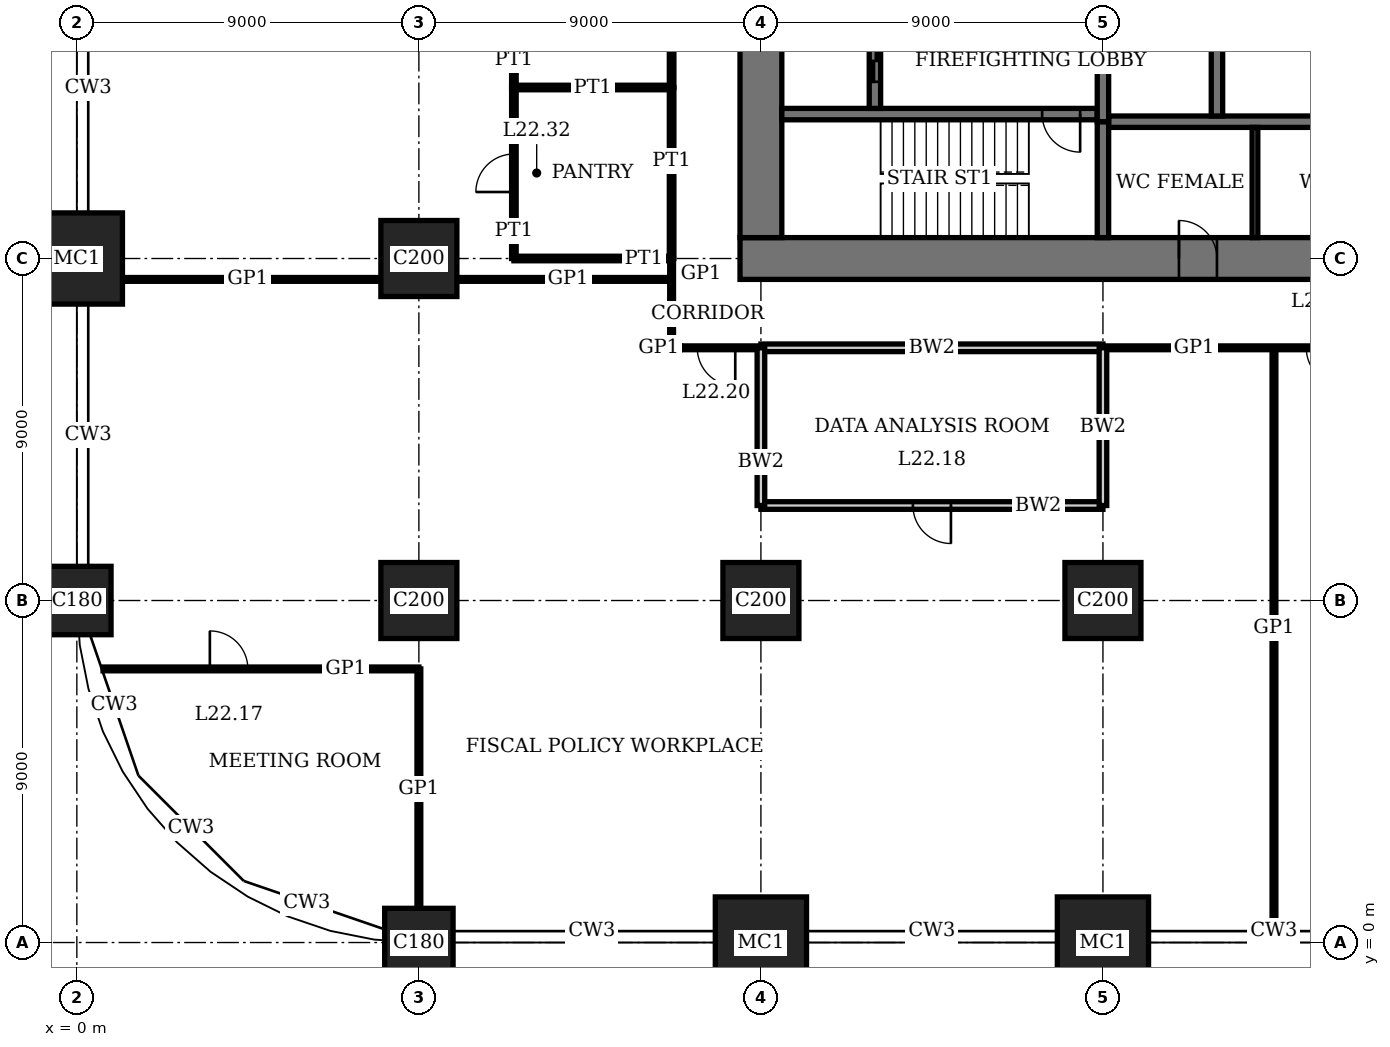
"""IFC4 building model, lengths in metres.
Left out: names, types, materials, properties, quantities, classifications, styles, units other than length and angle.
Written with IfcOpenShell. Run it as: python <this file> out.ifc"""

import sys

from ifc_helpers import new_model, si_unit, direction, frame, frame_2d, origin, origin_2d, place, context, subcontext, project, spatial, rectangle, extrude, element, fill, save


model = new_model("IFC4")
c1 = context("Model", 3, precision=1e-05, world=origin(), true_north=direction((0.0, 1.0)))
c2 = subcontext(c1, "Body", "Model", "MODEL_VIEW")
j1 = project(units=[si_unit("LENGTHUNIT", "METRE"), si_unit("PLANEANGLEUNIT", "RADIAN")], contexts=[c1])
p1 = place(None, origin())
s1 = spatial("IfcSite", under=j1, at=p1, CompositionType="ELEMENT")
p2 = place(p1, origin())
s2 = spatial("IfcBuilding", under=s1, at=p2, CompositionType="ELEMENT")
p3 = place(p2, frame((0.0, 0.0, 93.0)))
s3 = spatial("IfcBuildingStorey", under=s2, at=p3, CompositionType="ELEMENT", Elevation=93.0)
p4 = place(p3, frame((0.0, 9.0, 0.0), z_axis=(0.0, 0.0, 1.0), x_axis=(1.0, 0.0, 0.0)))
e1 = element("IfcColumn", 1, at=p4, inside=s3, PredefinedType="COLUMN", context=c2, shape_type="SweptSolid", body=[
    extrude(rectangle(XDim=1.8, YDim=1.8, at=origin_2d()), origin(), (0.0, 0.0, 1.0), 4.0),
])
p5 = place(p3, frame((0.0, 18.0, 0.0), z_axis=(0.0, 0.0, 1.0), x_axis=(1.0, 0.0, 0.0)))
e2 = element("IfcColumn", 2, at=p5, inside=s3, PredefinedType="COLUMN", context=c2, shape_type="SweptSolid", body=[
    extrude(rectangle(XDim=2.4, YDim=2.4, at=origin_2d()), origin(), (0.0, 0.0, 1.0), 4.0),
])
p6 = place(p3, frame((9.0, 0.0, 0.0), z_axis=(0.0, 0.0, 1.0), x_axis=(1.0, 0.0, 0.0)))
e3 = element("IfcColumn", 3, at=p6, inside=s3, PredefinedType="COLUMN", context=c2, shape_type="SweptSolid", body=[
    extrude(rectangle(XDim=1.8, YDim=1.8, at=origin_2d()), origin(), (0.0, 0.0, 1.0), 4.0),
])
for number, where, z_axis, x_axis in (
    (4, (9.0, 9.0, 0.0), (0.0, 0.0, 1.0), (1.0, 0.0, 0.0)),
    (5, (9.0, 18.0, 0.0), (0.0, 0.0, 1.0), (1.0, 0.0, 0.0)),
):
    element("IfcColumn", number, at=place(p3, frame(where, z_axis=z_axis, x_axis=x_axis)), inside=s3, PredefinedType="COLUMN", context=c2, shape_type="SweptSolid", body=[
        extrude(rectangle(XDim=2.0, YDim=2.0, at=origin_2d()), origin(), (0.0, 0.0, 1.0), 4.0),
    ])
p7 = place(p3, frame((18.0, 0.0, 0.0), z_axis=(0.0, 0.0, 1.0), x_axis=(1.0, 0.0, 0.0)))
e6 = element("IfcColumn", 6, at=p7, inside=s3, PredefinedType="COLUMN", context=c2, shape_type="SweptSolid", body=[
    extrude(rectangle(XDim=2.4, YDim=2.4, at=origin_2d()), origin(), (0.0, 0.0, 1.0), 4.0),
])
p8 = place(p3, frame((18.0, 9.0, 0.0), z_axis=(0.0, 0.0, 1.0), x_axis=(1.0, 0.0, 0.0)))
e7 = element("IfcColumn", 7, at=p8, inside=s3, PredefinedType="COLUMN", context=c2, shape_type="SweptSolid", body=[
    extrude(rectangle(XDim=2.0, YDim=2.0, at=origin_2d()), origin(), (0.0, 0.0, 1.0), 4.0),
])
p9 = place(p3, frame((27.0, 0.0, 0.0), z_axis=(0.0, 0.0, 1.0), x_axis=(1.0, 0.0, 0.0)))
e8 = element("IfcColumn", 8, at=p9, inside=s3, PredefinedType="COLUMN", context=c2, shape_type="SweptSolid", body=[
    extrude(rectangle(XDim=2.4, YDim=2.4, at=origin_2d()), origin(), (0.0, 0.0, 1.0), 4.0),
])
p10 = place(p3, frame((27.0, 9.0, 0.0), z_axis=(0.0, 0.0, 1.0), x_axis=(1.0, 0.0, 0.0)))
e9 = element("IfcColumn", 9, at=p10, inside=s3, PredefinedType="COLUMN", context=c2, shape_type="SweptSolid", body=[
    extrude(rectangle(XDim=2.0, YDim=2.0, at=origin_2d()), origin(), (0.0, 0.0, 1.0), 4.0),
])
p11 = place(p3, frame((17.45, 18.0, 0.0), z_axis=(0.0, 0.0, 1.0), x_axis=(1.0, 0.0, 0.0)))
e10 = element("IfcWall", 10, at=p11, inside=s3, PredefinedType="SHEAR", context=c2, shape_type="SweptSolid", body=[
    extrude(rectangle(XDim=28.1, YDim=1.1, at=frame_2d((14.05, 0.0))), origin(), (0.0, 0.0, 1.0), 4.0),
])
p12 = place(p11, frame((11.55, 0.0, 0.0)))
e11 = element("IfcOpeningElement", 11, at=p12, cuts=e10, PredefinedType="OPENING", context=c2, shape_type="SweptSolid", body=[
    extrude(rectangle(XDim=1.0, YDim=2.4, at=frame_2d((0.5, 1.2))), frame((0.0, 0.56, 0.0), z_axis=(0.0, -1.0, 0.0), x_axis=(1.0, 0.0, 0.0)), (0.0, 0.0, 1.0), 1.12),
])
p13 = place(p11, frame((16.55, 0.0, 0.0)))
e12 = element("IfcOpeningElement", 12, at=p13, cuts=e10, PredefinedType="OPENING", context=c2, shape_type="SweptSolid", body=[
    extrude(rectangle(XDim=1.0, YDim=2.4, at=frame_2d((0.5, 1.2))), frame((0.0, 0.56, 0.0), z_axis=(0.0, -1.0, 0.0), x_axis=(1.0, 0.0, 0.0)), (0.0, 0.0, 1.0), 1.12),
])
p14 = place(p11, frame((20.0, 0.0, 0.0)))
e13 = element("IfcOpeningElement", 13, at=p14, cuts=e10, PredefinedType="OPENING", context=c2, shape_type="SweptSolid", body=[
    extrude(rectangle(XDim=1.1, YDim=2.4, at=frame_2d((0.55, 1.2))), frame((0.0, 0.56, 0.0), z_axis=(0.0, -1.0, 0.0), x_axis=(1.0, 0.0, 0.0)), (0.0, 0.0, 1.0), 1.12),
])
p15 = place(p11, frame((24.05, 0.0, 0.0)))
e14 = element("IfcOpeningElement", 14, at=p15, cuts=e10, PredefinedType="OPENING", context=c2, shape_type="SweptSolid", body=[
    extrude(rectangle(XDim=1.0, YDim=2.4, at=frame_2d((0.5, 1.2))), frame((0.0, 0.56, 0.0), z_axis=(0.0, -1.0, 0.0), x_axis=(1.0, 0.0, 0.0)), (0.0, 0.0, 1.0), 1.12),
])
p16 = place(p3, frame((18.0, 35.45, 0.0), z_axis=(0.0, 0.0, 1.0), x_axis=(0.0, -1.0, 0.0)))
e15 = element("IfcWall", 15, at=p16, inside=s3, PredefinedType="SHEAR", context=c2, shape_type="SweptSolid", body=[
    extrude(rectangle(XDim=16.9, YDim=1.1, at=frame_2d((8.45, 0.0))), origin(), (0.0, 0.0, 1.0), 4.0),
])
p17 = place(p16, frame((8.45, 0.0, 0.0)))
e16 = element("IfcOpeningElement", 16, at=p17, cuts=e15, PredefinedType="OPENING", context=c2, shape_type="SweptSolid", body=[
    extrude(rectangle(XDim=1.8, YDim=2.4, at=frame_2d((0.9, 1.2))), frame((0.0, 0.56, 0.0), z_axis=(0.0, -1.0, 0.0), x_axis=(1.0, 0.0, 0.0)), (0.0, 0.0, 1.0), 1.12),
])
p18 = place(p3, frame((18.55, 21.8, 0.0), z_axis=(0.0, 0.0, 1.0), x_axis=(1.0, 0.0, 0.0)))
e17 = element("IfcWall", 17, at=p18, inside=s3, PredefinedType="SHEAR", context=c2, shape_type="SweptSolid", body=[
    extrude(rectangle(XDim=8.3, YDim=0.3, at=frame_2d((4.15, 0.0))), origin(), (0.0, 0.0, 1.0), 4.0),
])
p19 = place(p18, frame((6.85, 0.0, 0.0)))
e18 = element("IfcOpeningElement", 18, at=p19, cuts=e17, PredefinedType="OPENING", context=c2, shape_type="SweptSolid", body=[
    extrude(rectangle(XDim=1.0, YDim=2.4, at=frame_2d((0.5, 1.2))), frame((0.0, 0.16, 0.0), z_axis=(0.0, -1.0, 0.0), x_axis=(1.0, 0.0, 0.0)), (0.0, 0.0, 1.0), 0.32),
])
p20 = place(p3, frame((27.0, 18.55, 0.0), z_axis=(0.0, 0.0, 1.0), x_axis=(0.0, 1.0, 0.0)))
e19 = element("IfcWall", 19, at=p20, inside=s3, PredefinedType="SHEAR", context=c2, shape_type="SweptSolid", body=[
    extrude(rectangle(XDim=3.05, YDim=0.3, at=frame_2d((1.525, 0.0))), origin(), (0.0, 0.0, 1.0), 4.0),
])
p21 = place(p3, frame((21.0, 21.95, 0.0), z_axis=(0.0, 0.0, 1.0), x_axis=(0.0, 1.0, 0.0)))
e20 = element("IfcWall", 20, at=p21, inside=s3, PredefinedType="SHEAR", context=c2, shape_type="SweptSolid", body=[
    extrude(rectangle(XDim=2.5, YDim=0.3, at=frame_2d((1.25, 0.0))), origin(), (0.0, 0.0, 1.0), 4.0),
])
p22 = place(p21, frame((0.7, 0.0, 0.0)))
e21 = element("IfcOpeningElement", 21, at=p22, cuts=e20, PredefinedType="OPENING", context=c2, shape_type="SweptSolid", body=[
    extrude(rectangle(XDim=1.1, YDim=2.4, at=frame_2d((0.55, 1.2))), frame((0.0, 0.16, 0.0), z_axis=(0.0, -1.0, 0.0), x_axis=(1.0, 0.0, 0.0)), (0.0, 0.0, 1.0), 0.32),
])
p23 = place(p3, frame((27.15, 21.6, 0.0), z_axis=(0.0, 0.0, 1.0), x_axis=(1.0, 0.0, 0.0)))
e22 = element("IfcWall", 22, at=p23, inside=s3, PredefinedType="SHEAR", context=c2, shape_type="SweptSolid", body=[
    extrude(rectangle(XDim=17.3, YDim=0.3, at=frame_2d((8.65, 0.0))), origin(), (0.0, 0.0, 1.0), 4.0),
])
p24 = place(p3, frame((30.0, 21.75, 0.0), z_axis=(0.0, 0.0, 1.0), x_axis=(0.0, 1.0, 0.0)))
e23 = element("IfcWall", 23, at=p24, inside=s3, PredefinedType="SHEAR", context=c2, shape_type="SweptSolid", body=[
    extrude(rectangle(XDim=2.7, YDim=0.3, at=frame_2d((1.35, 0.0))), origin(), (0.0, 0.0, 1.0), 4.0),
])
p25 = place(p3, frame((27.0, 21.6, 0.0), z_axis=(0.0, 0.0, 1.0), x_axis=(0.0, 1.0, 0.0)))
e24 = element("IfcWall", 24, at=p25, inside=s3, PredefinedType="SHEAR", context=c2, shape_type="SweptSolid", body=[
    extrude(rectangle(XDim=2.85, YDim=0.3, at=frame_2d((1.425, 0.0))), origin(), (0.0, 0.0, 1.0), 4.0),
])
p26 = place(p3, frame((0.69, 7.2, 0.0), z_axis=(0.0, 0.0, 1.0), x_axis=(1.0, 0.0, 0.0)))
e25 = element("IfcWall", 25, at=p26, inside=s3, PredefinedType="PARTITIONING", context=c2, shape_type="SweptSolid", body=[
    extrude(rectangle(XDim=8.31, YDim=0.1, at=frame_2d((4.155, 0.0))), origin(), (0.0, 0.0, 1.0), 3.75),
])
p27 = place(p26, frame((2.81, 0.0, 0.0)))
e26 = element("IfcOpeningElement", 26, at=p27, cuts=e25, PredefinedType="OPENING", context=c2, shape_type="SweptSolid", body=[
    extrude(rectangle(XDim=1.0, YDim=2.4, at=frame_2d((0.5, 1.2))), frame((0.0, 0.06, 0.0), z_axis=(0.0, -1.0, 0.0), x_axis=(1.0, 0.0, 0.0)), (0.0, 0.0, 1.0), 0.12),
])
p28 = place(p3, frame((18.0, 11.5, 0.0), z_axis=(0.0, 0.0, 1.0), x_axis=(1.0, 0.0, 0.0)))
e27 = element("IfcWall", 27, at=p28, inside=s3, PredefinedType="SOLIDWALL", context=c2, shape_type="SweptSolid", body=[
    extrude(rectangle(XDim=9.0, YDim=0.2, at=frame_2d((4.5, 0.0))), origin(), (0.0, 0.0, 1.0), 3.75),
])
p29 = place(p28, frame((4.0, 0.0, 0.0)))
e28 = element("IfcOpeningElement", 28, at=p29, cuts=e27, PredefinedType="OPENING", context=c2, shape_type="SweptSolid", body=[
    extrude(rectangle(XDim=1.0, YDim=2.4, at=frame_2d((0.5, 1.2))), frame((0.0, 0.11, 0.0), z_axis=(0.0, -1.0, 0.0), x_axis=(1.0, 0.0, 0.0)), (0.0, 0.0, 1.0), 0.22),
])
p30 = place(p3, frame((18.0, 15.65, 0.0), z_axis=(0.0, 0.0, 1.0), x_axis=(1.0, 0.0, 0.0)))
e29 = element("IfcWall", 29, at=p30, inside=s3, PredefinedType="SOLIDWALL", context=c2, shape_type="SweptSolid", body=[
    extrude(rectangle(XDim=9.0, YDim=0.2, at=frame_2d((4.5, 0.0))), origin(), (0.0, 0.0, 1.0), 3.75),
])
p31 = place(p3, frame((15.65, 15.65, 0.0), z_axis=(0.0, 0.0, 1.0), x_axis=(1.0, 0.0, 0.0)))
e30 = element("IfcWall", 30, at=p31, inside=s3, PredefinedType="PARTITIONING", context=c2, shape_type="SweptSolid", body=[
    extrude(rectangle(XDim=2.35, YDim=0.1, at=frame_2d((1.175, 0.0))), origin(), (0.0, 0.0, 1.0), 3.75),
])
p32 = place(p31, frame((0.675, 0.0, 0.0)))
e31 = element("IfcOpeningElement", 31, at=p32, cuts=e30, PredefinedType="OPENING", context=c2, shape_type="SweptSolid", body=[
    extrude(rectangle(XDim=1.0, YDim=2.4, at=frame_2d((0.5, 1.2))), frame((0.0, 0.06, 0.0), z_axis=(0.0, -1.0, 0.0), x_axis=(1.0, 0.0, 0.0)), (0.0, 0.0, 1.0), 0.12),
])
p33 = place(p3, frame((27.0, 15.65, 0.0), z_axis=(0.0, 0.0, 1.0), x_axis=(1.0, 0.0, 0.0)))
e32 = element("IfcWall", 32, at=p33, inside=s3, PredefinedType="PARTITIONING", context=c2, shape_type="SweptSolid", body=[
    extrude(rectangle(XDim=9.0, YDim=0.1, at=frame_2d((4.5, 0.0))), origin(), (0.0, 0.0, 1.0), 3.75),
])
p34 = place(p33, frame((5.35, 0.0, 0.0)))
e33 = element("IfcOpeningElement", 33, at=p34, cuts=e32, PredefinedType="OPENING", context=c2, shape_type="SweptSolid", body=[
    extrude(rectangle(XDim=1.0, YDim=2.4, at=frame_2d((0.5, 1.2))), frame((0.0, 0.06, 0.0), z_axis=(0.0, -1.0, 0.0), x_axis=(1.0, 0.0, 0.0)), (0.0, 0.0, 1.0), 0.12),
])
p35 = place(p3, frame((1.2, 17.45, 0.0), z_axis=(0.0, 0.0, 1.0), x_axis=(1.0, 0.0, 0.0)))
e34 = element("IfcWall", 34, at=p35, inside=s3, PredefinedType="PARTITIONING", context=c2, shape_type="SweptSolid", body=[
    extrude(rectangle(XDim=6.8, YDim=0.1, at=frame_2d((3.4, 0.0))), origin(), (0.0, 0.0, 1.0), 3.75),
])
p36 = place(p3, frame((10.0, 17.45, 0.0), z_axis=(0.0, 0.0, 1.0), x_axis=(1.0, 0.0, 0.0)))
e35 = element("IfcWall", 35, at=p36, inside=s3, PredefinedType="PARTITIONING", context=c2, shape_type="SweptSolid", body=[
    extrude(rectangle(XDim=5.65, YDim=0.1, at=frame_2d((2.825, 0.0))), origin(), (0.0, 0.0, 1.0), 3.75),
])
p37 = place(p3, frame((11.5, 18.0, 0.0), z_axis=(0.0, 0.0, 1.0), x_axis=(1.0, 0.0, 0.0)))
e36 = element("IfcWall", 36, at=p37, inside=s3, PredefinedType="PARTITIONING", context=c2, shape_type="SweptSolid", body=[
    extrude(rectangle(XDim=4.15, YDim=0.12, at=frame_2d((2.075, 0.0))), origin(), (0.0, 0.0, 1.0), 3.05),
])
p38 = place(p3, frame((11.5, 22.5, 0.0), z_axis=(0.0, 0.0, 1.0), x_axis=(1.0, 0.0, 0.0)))
e37 = element("IfcWall", 37, at=p38, inside=s3, PredefinedType="PARTITIONING", context=c2, shape_type="SweptSolid", body=[
    extrude(rectangle(XDim=4.15, YDim=0.12, at=frame_2d((2.075, 0.0))), origin(), (0.0, 0.0, 1.0), 3.1),
])
p39 = place(p3, frame((9.0, 0.9, 0.0), z_axis=(0.0, 0.0, 1.0), x_axis=(0.0, 1.0, 0.0)))
e38 = element("IfcWall", 38, at=p39, inside=s3, PredefinedType="PARTITIONING", context=c2, shape_type="SweptSolid", body=[
    extrude(rectangle(XDim=6.3, YDim=0.1, at=frame_2d((3.15, 0.0))), origin(), (0.0, 0.0, 1.0), 3.05),
])
p40 = place(p3, frame((11.5, 18.0, 0.0), z_axis=(0.0, 0.0, 1.0), x_axis=(0.0, 1.0, 0.0)))
e39 = element("IfcWall", 39, at=p40, inside=s3, PredefinedType="PARTITIONING", context=c2, shape_type="SweptSolid", body=[
    extrude(rectangle(XDim=4.5, YDim=0.12, at=frame_2d((2.25, 0.0))), origin(), (0.0, 0.0, 1.0), 3.75),
])
p41 = place(p40, frame((1.75, 0.0, 0.0)))
e40 = element("IfcOpeningElement", 40, at=p41, cuts=e39, PredefinedType="OPENING", context=c2, shape_type="SweptSolid", body=[
    extrude(rectangle(XDim=1.0, YDim=2.4, at=frame_2d((0.5, 1.2))), frame((0.0, 0.07, 0.0), z_axis=(0.0, -1.0, 0.0), x_axis=(1.0, 0.0, 0.0)), (0.0, 0.0, 1.0), 0.14),
])
p42 = place(p3, frame((11.5, 22.5, 0.0), z_axis=(0.0, 0.0, 1.0), x_axis=(0.0, 1.0, 0.0)))
e41 = element("IfcWall", 41, at=p42, inside=s3, PredefinedType="PARTITIONING", context=c2, shape_type="SweptSolid", body=[
    extrude(rectangle(XDim=4.5, YDim=0.12, at=frame_2d((2.25, 0.0))), origin(), (0.0, 0.0, 1.0), 3.75),
])
p43 = place(p42, frame((1.75, 0.0, 0.0)))
e42 = element("IfcOpeningElement", 42, at=p43, cuts=e41, PredefinedType="OPENING", context=c2, shape_type="SweptSolid", body=[
    extrude(rectangle(XDim=1.0, YDim=2.4, at=frame_2d((0.5, 1.2))), frame((0.0, 0.07, 0.0), z_axis=(0.0, -1.0, 0.0), x_axis=(1.0, 0.0, 0.0)), (0.0, 0.0, 1.0), 0.14),
])
for number, where, z_axis, x_axis in (
    (43, (15.65, 18.0, 0.0), (0.0, 0.0, 1.0), (0.0, 1.0, 0.0)),
    (44, (15.65, 22.5, 0.0), (0.0, 0.0, 1.0), (0.0, 1.0, 0.0)),
):
    element("IfcWall", number, at=place(p3, frame(where, z_axis=z_axis, x_axis=x_axis)), inside=s3, PredefinedType="PARTITIONING", context=c2, shape_type="SweptSolid", body=[
        extrude(rectangle(XDim=4.5, YDim=0.12, at=frame_2d((2.25, 0.0))), origin(), (0.0, 0.0, 1.0), 3.75),
    ])
p44 = place(p3, frame((15.65, 15.65, 0.0), z_axis=(0.0, 0.0, 1.0), x_axis=(0.0, 1.0, 0.0)))
e45 = element("IfcWall", 45, at=p44, inside=s3, PredefinedType="PARTITIONING", context=c2, shape_type="SweptSolid", body=[
    extrude(rectangle(XDim=2.35, YDim=0.1, at=frame_2d((1.175, 0.0))), origin(), (0.0, 0.0, 1.0), 3.75),
])
for number, where, z_axis, x_axis in (
    (46, (18.0, 11.5, 0.0), (0.0, 0.0, 1.0), (0.0, 1.0, 0.0)),
    (47, (27.0, 11.5, 0.0), (0.0, 0.0, 1.0), (0.0, 1.0, 0.0)),
):
    element("IfcWall", number, at=place(p3, frame(where, z_axis=z_axis, x_axis=x_axis)), inside=s3, PredefinedType="SOLIDWALL", context=c2, shape_type="SweptSolid", body=[
        extrude(rectangle(XDim=4.15, YDim=0.2, at=frame_2d((2.075, 0.0))), origin(), (0.0, 0.0, 1.0), 3.05),
    ])
p45 = place(p3, frame((31.5, 0.31, 0.0), z_axis=(0.0, 0.0, 1.0), x_axis=(0.0, 1.0, 0.0)))
e48 = element("IfcWall", 48, at=p45, inside=s3, PredefinedType="PARTITIONING", context=c2, shape_type="SweptSolid", body=[
    extrude(rectangle(XDim=15.34, YDim=0.1, at=frame_2d((7.67, 0.0))), origin(), (0.0, 0.0, 1.0), 3.75),
])
p46 = place(p3, frame((31.0, 18.55, 0.0), z_axis=(0.0, 0.0, 1.0), x_axis=(0.0, 1.0, 0.0)))
e49 = element("IfcWall", 49, at=p46, inside=s3, PredefinedType="PARTITIONING", context=c2, shape_type="SweptSolid", body=[
    extrude(rectangle(XDim=2.9, YDim=0.15, at=frame_2d((1.45, 0.0))), origin(), (0.0, 0.0, 1.0), 3.75),
])
p47 = place(p12, origin())
e50 = element("IfcDoor", 50, at=p47, inside=s3, OperationType="SINGLE_SWING_RIGHT", PredefinedType="DOOR", context=c2, shape_type="SweptSolid", body=[
    extrude(rectangle(XDim=1.0, YDim=2.4, at=frame_2d((0.5, 1.2))), frame((0.0, 0.025, 0.0), z_axis=(0.0, -1.0, 0.0), x_axis=(1.0, 0.0, 0.0)), (0.0, 0.0, 1.0), 0.05),
    extrude(rectangle(XDim=0.04, YDim=2.4, at=frame_2d((0.02, 1.2))), frame((0.0, 0.4, 0.0), z_axis=(0.0, -1.0, 0.0), x_axis=(1.0, 0.0, 0.0)), (0.0, 0.0, 1.0), 0.8),
    extrude(rectangle(XDim=0.04, YDim=2.4, at=frame_2d((0.98, 1.2))), frame((0.0, 0.4, 0.0), z_axis=(0.0, -1.0, 0.0), x_axis=(1.0, 0.0, 0.0)), (0.0, 0.0, 1.0), 0.8),
    extrude(rectangle(XDim=1.0, YDim=0.04, at=frame_2d((0.5, 2.38))), frame((0.0, 0.4, 0.0), z_axis=(0.0, -1.0, 0.0), x_axis=(1.0, 0.0, 0.0)), (0.0, 0.0, 1.0), 0.8),
])
fill(e11, e50)
p48 = place(p19, origin())
e51 = element("IfcDoor", 51, at=p48, inside=s3, OperationType="SINGLE_SWING_RIGHT", PredefinedType="DOOR", context=c2, shape_type="SweptSolid", body=[
    extrude(rectangle(XDim=1.0, YDim=2.4, at=frame_2d((0.5, 1.2))), frame((0.0, 0.03, 0.0), z_axis=(0.0, -1.0, 0.0), x_axis=(1.0, 0.0, 0.0)), (0.0, 0.0, 1.0), 0.06),
])
fill(e18, e51)
p49 = place(p27, origin())
e52 = element("IfcDoor", 52, at=p49, inside=s3, OperationType="SINGLE_SWING_RIGHT", PredefinedType="DOOR", context=c2, shape_type="SweptSolid", body=[
    extrude(rectangle(XDim=1.0, YDim=2.4, at=frame_2d((0.5, 1.2))), frame((0.0, 0.02, 0.0), z_axis=(0.0, -1.0, 0.0), x_axis=(1.0, 0.0, 0.0)), (0.0, 0.0, 1.0), 0.04),
])
fill(e26, e52)
p50 = place(p29, origin())
e53 = element("IfcDoor", 53, at=p50, inside=s3, OperationType="SINGLE_SWING_RIGHT", PredefinedType="DOOR", context=c2, shape_type="SweptSolid", body=[
    extrude(rectangle(XDim=1.0, YDim=2.4, at=frame_2d((0.5, 1.2))), frame((0.0, 0.035, 0.0), z_axis=(0.0, -1.0, 0.0), x_axis=(1.0, 0.0, 0.0)), (0.0, 0.0, 1.0), 0.07),
])
fill(e28, e53)
p51 = place(p32, origin())
e54 = element("IfcDoor", 54, at=p51, inside=s3, OperationType="SINGLE_SWING_RIGHT", PredefinedType="DOOR", context=c2, shape_type="SweptSolid", body=[
    extrude(rectangle(XDim=1.0, YDim=2.4, at=frame_2d((0.5, 1.2))), frame((0.0, 0.02, 0.0), z_axis=(0.0, -1.0, 0.0), x_axis=(1.0, 0.0, 0.0)), (0.0, 0.0, 1.0), 0.04),
])
fill(e31, e54)
p52 = place(p34, origin())
e55 = element("IfcDoor", 55, at=p52, inside=s3, OperationType="SINGLE_SWING_RIGHT", PredefinedType="DOOR", context=c2, shape_type="SweptSolid", body=[
    extrude(rectangle(XDim=1.0, YDim=2.4, at=frame_2d((0.5, 1.2))), frame((0.0, 0.02, 0.0), z_axis=(0.0, -1.0, 0.0), x_axis=(1.0, 0.0, 0.0)), (0.0, 0.0, 1.0), 0.04),
])
fill(e33, e55)
p53 = place(p41, origin())
e56 = element("IfcDoor", 56, at=p53, inside=s3, OperationType="SINGLE_SWING_RIGHT", PredefinedType="DOOR", context=c2, shape_type="SweptSolid", body=[
    extrude(rectangle(XDim=1.0, YDim=2.4, at=frame_2d((0.5, 1.2))), frame((0.0, 0.025, 0.0), z_axis=(0.0, -1.0, 0.0), x_axis=(1.0, 0.0, 0.0)), (0.0, 0.0, 1.0), 0.05),
])
fill(e40, e56)
p54 = place(p22, origin())
e57 = element("IfcDoor", 57, at=p54, inside=s3, OperationType="DOUBLE_DOOR_SLIDING", PredefinedType="DOOR", context=c2, shape_type="SweptSolid", body=[
    extrude(rectangle(XDim=1.1, YDim=2.4, at=frame_2d((0.55, 1.2))), frame((0.0, 0.03, 0.0), z_axis=(0.0, -1.0, 0.0), x_axis=(1.0, 0.0, 0.0)), (0.0, 0.0, 1.0), 0.06),
])
fill(e21, e57)
save(model, sys.argv[1])
